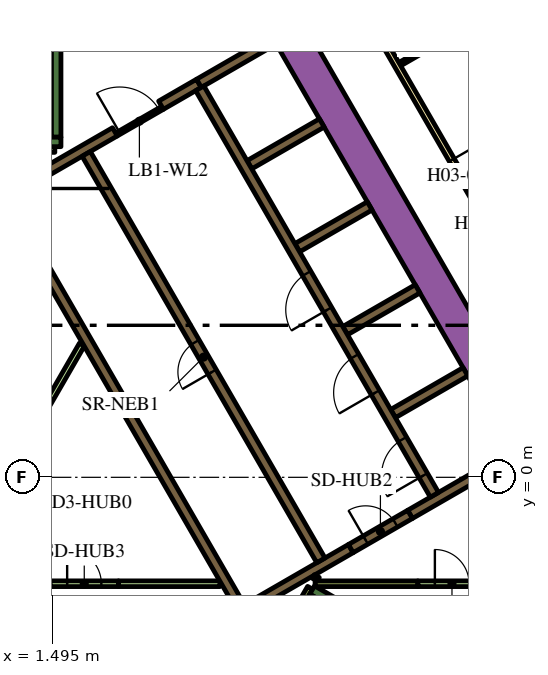
"""IFC4 building model, lengths in metres.
Left out: names, types, materials, properties, quantities, classifications, styles, units other than length and angle.
Written with IfcOpenShell. Run it as: python <this file> out.ifc"""

import sys

from ifc_helpers import new_model, si_unit, direction, frame, frame_2d, origin, place, context, subcontext, project, spatial, polyline, rectangle, outline, extrude, element, fill, save


model = new_model("IFC4")
c1 = context("Model", 3, precision=1e-05, world=origin(), true_north=direction((0.0, 1.0)))
c2 = subcontext(c1, "Body", "Model", "MODEL_VIEW")
j1 = project(units=[si_unit("LENGTHUNIT", "METRE"), si_unit("PLANEANGLEUNIT", "RADIAN")], contexts=[c1])
p1 = place(None, origin())
s1 = spatial("IfcSite", under=j1, at=p1, CompositionType="ELEMENT")
p2 = place(p1, origin())
s2 = spatial("IfcBuilding", under=s1, at=p2, CompositionType="ELEMENT")
p3 = place(p2, frame((0.0, 0.0, 54.9)))
s3 = spatial("IfcBuildingStorey", under=s2, at=p3, CompositionType="ELEMENT", Elevation=54.9)
p4 = place(p3, frame((6.776, 13.364, 0.0), z_axis=(0.0, 0.0, 1.0), x_axis=(0.500004177138, -0.8660229921, 0.0)))
e1 = element("IfcWall", 1, at=p4, inside=s3, PredefinedType="SOLIDWALL", context=c2, shape_type="SweptSolid", body=[
    extrude(rectangle(XDim=20.204, YDim=0.9, at=frame_2d((10.102, 0.0))), origin(), (0.0, 0.0, 1.0), 3.9),
])
p5 = place(p3, frame((8.334, -2.964, 0.0), z_axis=(0.0, 0.0, 1.0), x_axis=(0.866016039709, -0.500016218704, 0.0)))
e2 = element("IfcWall", 2, at=p5, inside=s3, PredefinedType="SOLIDWALL", context=c2, shape_type="SweptSolid", body=[
    extrude(rectangle(XDim=7.05, YDim=0.25, at=frame_2d((3.525, 0.0))), origin(), (0.0, 0.0, 1.0), 3.9),
])
p6 = place(p3, frame((8.163, -3.511, 0.0), z_axis=(0.0, 0.0, 1.0), x_axis=(0.500127794843, 0.865951608824, 0.0)))
e3 = element("IfcWall", 3, at=p6, inside=s3, PredefinedType="SOLIDWALL", context=c2, shape_type="SweptSolid", body=[
    extrude(rectangle(XDim=0.435, YDim=0.25, at=frame_2d((0.217, 0.0))), origin(), (0.0, 0.0, 1.0), 3.9),
])
p7 = place(p3, frame((1.6, 8.95, 0.0), z_axis=(0.0, 0.0, 1.0), x_axis=(0.0, 1.0, 0.0)))
e4 = element("IfcWall", 4, at=p7, inside=s3, PredefinedType="SOLIDWALL", context=c2, shape_type="SweptSolid", body=[
    extrude(rectangle(XDim=6.8, YDim=0.25, at=frame_2d((3.4, 0.0))), origin(), (0.0, 0.0, 1.0), 3.9),
])
p8 = place(p3, frame((1.05, 8.825, 0.0), z_axis=(0.0, 0.0, 1.0), x_axis=(1.0, 0.0, 0.0)))
e5 = element("IfcWall", 5, at=p8, inside=s3, PredefinedType="SOLIDWALL", context=c2, shape_type="SweptSolid", body=[
    extrude(rectangle(XDim=0.675, YDim=0.25, at=frame_2d((0.337, 0.0))), origin(), (0.0, 0.0, 1.0), 3.9),
])
p9 = place(p3, frame((10.464, 1.677, 0.0), z_axis=(0.0, 0.0, 1.0), x_axis=(0.86605622881, 0.499946605688, 0.0)))
e6 = element("IfcWall", 6, at=p9, inside=s3, PredefinedType="SOLIDWALL", context=c2, shape_type="SweptSolid", body=[
    extrude(rectangle(XDim=2.2, YDim=0.25, at=frame_2d((1.1, 0.0))), origin(), (0.0, 0.0, 1.0), 3.9),
])
p10 = place(p3, origin())
e7 = element("IfcWall", 7, at=p10, inside=s3, PredefinedType="SOLIDWALL", context=c2, shape_type="SweptSolid", body=[
    extrude(outline(polyline([(0.335, 6.925), (0.335, 6.925), (0.335, 7.075), (0.335, 7.075), (0.335, 7.075), (0.245, 7.075), (0.079, 7.363), (0.035, 7.439), (0.252, 7.564), (0.377, 7.348), (6.552, -3.348), (6.677, -3.564), (6.46, -3.689), (4.897, -0.981), (0.332, 6.925), (0.335, 6.925), (0.335, 6.925)])), origin(), (0.0, 0.0, 1.0), 3.9),
])
p11 = place(p3, frame((4.358, 9.791, 0.0), z_axis=(0.0, 0.0, 1.0), x_axis=(0.866079547155, 0.499906209203, 0.0)))
e8 = element("IfcWall", 8, at=p11, inside=s3, PredefinedType="SOLIDWALL", context=c2, shape_type="SweptSolid", body=[
    extrude(rectangle(XDim=1.15, YDim=0.25, at=frame_2d((0.575, 0.0))), origin(), (0.0, 0.0, 1.0), 3.9),
])
p12 = place(p3, frame((5.356, 10.367, 0.0), z_axis=(0.0, 0.0, 1.0), x_axis=(0.865978535641, 0.50008116922, 0.0)))
e9 = element("IfcWall", 9, at=p12, inside=s3, PredefinedType="SOLIDWALL", context=c2, shape_type="SweptSolid", body=[
    extrude(rectangle(XDim=2.278, YDim=0.25, at=frame_2d((1.139, 0.0))), origin(), (0.0, 0.0, 1.0), 3.9),
])
p13 = place(p3, frame((0.314, 7.456, 0.0), z_axis=(0.0, 0.0, 1.0), x_axis=(0.866013897511, 0.50001992892, 0.0)))
e10 = element("IfcWall", 10, at=p13, inside=s3, PredefinedType="SOLIDWALL", context=c2, shape_type="SweptSolid", body=[
    extrude(rectangle(XDim=3.268, YDim=0.25, at=frame_2d((1.634, 0.0))), origin(), (0.0, 0.0, 1.0), 3.9),
])
p14 = place(p3, frame((9.352, -1.875, 0.0), z_axis=(0.0, 0.0, 1.0), x_axis=(-0.866024844342, -0.500000968981, 0.0)))
e11 = element("IfcWall", 11, at=p14, inside=s3, PredefinedType="SOLIDWALL", context=c2, shape_type="SweptSolid", body=[
    extrude(rectangle(XDim=3.162, YDim=0.25, at=frame_2d((1.581, 0.0))), origin(), (0.0, 0.0, 1.0), 3.9),
])
for number, where, z_axis, x_axis in (
    (12, (6.684, 8.224, 0.0), (0.0, 0.0, 1.0), (0.866, 0.5, 0.0)),
    (13, (7.944, 6.041, 0.0), (0.0, 0.0, 1.0), (0.866, 0.5, 0.0)),
    (14, (9.204, 3.859, 0.0), (0.0, 0.0, 1.0), (0.866, 0.5, 0.0)),
):
    element("IfcWall", number, at=place(p3, frame(where, z_axis=z_axis, x_axis=x_axis)), inside=s3, PredefinedType="SOLIDWALL", context=c2, shape_type="SweptSolid", body=[
        extrude(rectangle(XDim=2.2, YDim=0.25, at=frame_2d((1.1, 0.0))), origin(), (0.0, 0.0, 1.0), 3.9),
    ])
p15 = place(p3, frame((10.911, -0.975, 0.0), z_axis=(0.0, 0.0, 1.0), x_axis=(0.866046979468, 0.499962627957, 0.0)))
e15 = element("IfcWall", 15, at=p15, inside=s3, PredefinedType="SOLIDWALL", context=c2, shape_type="SweptSolid", body=[
    extrude(rectangle(XDim=3.138, YDim=0.25, at=frame_2d((1.569, 0.0))), origin(), (0.0, 0.0, 1.0), 3.9),
])
p16 = place(p3, frame((8.412, -2.8, 0.0), z_axis=(0.0, 0.0, 1.0), x_axis=(1.0, 0.0, 0.0)))
e16 = element("IfcWall", 16, at=p16, inside=s3, PredefinedType="PARTITIONING", context=c2, shape_type="SweptSolid", body=[
    extrude(rectangle(XDim=2.702, YDim=0.15, at=frame_2d((1.351, 0.0))), origin(), (0.0, 0.0, 1.0), 3.9),
])
p17 = place(p3, frame((8.459, -2.599, 0.0), z_axis=(0.0, 0.0, 1.0), x_axis=(-0.501919277433, -0.864914469148, 0.0)))
e17 = element("IfcWall", 17, at=p17, inside=s3, PredefinedType="PARTITIONING", context=c2, shape_type="SweptSolid", body=[
    extrude(rectangle(XDim=0.109, YDim=0.15, at=frame_2d((0.054, 0.0))), origin(), (0.0, 0.0, 1.0), 3.9),
])
p18 = place(p3, frame((8.281, -2.907, 0.0), z_axis=(0.0, 0.0, 1.0), x_axis=(-0.500193841991, -0.86591346013, 0.0)))
e18 = element("IfcWall", 18, at=p18, inside=s3, PredefinedType="PARTITIONING", context=c2, shape_type="SweptSolid", body=[
    extrude(rectangle(XDim=0.583, YDim=0.15, at=frame_2d((0.292, 0.0))), origin(), (0.0, 0.0, 1.0), 3.9),
])
p19 = place(p3, frame((3.238, -2.8, 0.0), z_axis=(0.0, 0.0, 1.0), x_axis=(1.0, 0.0, 0.0)))
e19 = element("IfcWall", 19, at=p19, inside=s3, PredefinedType="PARTITIONING", context=c2, shape_type="SweptSolid", body=[
    extrude(rectangle(XDim=2.672, YDim=0.15, at=frame_2d((1.336, 0.0))), origin(), (0.0, 0.0, 1.0), 2.75),
])
p20 = place(p3, frame((1.016, 1.309, 0.0), z_axis=(0.0, 0.0, 1.0), x_axis=(0.49998231768, 0.866035612436, 0.0)))
e20 = element("IfcWall", 20, at=p20, inside=s3, PredefinedType="PARTITIONING", context=c2, shape_type="SweptSolid", body=[
    extrude(rectangle(XDim=2.521, YDim=0.15, at=frame_2d((1.26, 0.0))), origin(), (0.0, 0.0, 1.0), 2.75),
])
p21 = place(p3, frame((1.05, 8.625, 0.0), z_axis=(0.0, 0.0, 1.0), x_axis=(1.0, 0.0, 0.0)))
e21 = element("IfcWall", 21, at=p21, inside=s3, PredefinedType="PARTITIONING", context=c2, shape_type="SweptSolid", body=[
    extrude(rectangle(XDim=0.514, YDim=0.15, at=frame_2d((0.257, 0.0))), origin(), (0.0, 0.0, 1.0), 2.75),
])
p22 = place(p3, frame((11.553, -0.46, 0.0), z_axis=(0.0, 0.0, 1.0), x_axis=(-0.500006514828, 0.866021642414, 0.0)))
e22 = element("IfcWall", 22, at=p22, inside=s3, PredefinedType="SOLIDWALL", context=c2, shape_type="SweptSolid", body=[
    extrude(rectangle(XDim=12.35, YDim=0.25, at=frame_2d((6.175, 0.0))), origin(), (0.0, 0.0, 1.0), 3.9),
])
p23 = place(p22, frame((0.585, 0.0, 0.0)))
e23 = element("IfcOpeningElement", 23, at=p23, cuts=e22, PredefinedType="OPENING", context=c2, shape_type="SweptSolid", body=[
    extrude(rectangle(XDim=1.1, YDim=2.1, at=frame_2d((0.55, 1.05))), frame((0.0, 0.135, 0.0), z_axis=(0.0, -1.0, 0.0), x_axis=(1.0, 0.0, 0.0)), (0.0, 0.0, 1.0), 0.27),
])
p24 = place(p22, frame((3.105, 0.0, 0.0)))
e24 = element("IfcOpeningElement", 24, at=p24, cuts=e22, PredefinedType="OPENING", context=c2, shape_type="SweptSolid", body=[
    extrude(rectangle(XDim=1.1, YDim=2.1, at=frame_2d((0.55, 1.05))), frame((0.0, 0.135, 0.0), z_axis=(0.0, -1.0, 0.0), x_axis=(1.0, 0.0, 0.0)), (0.0, 0.0, 1.0), 0.27),
])
p25 = place(p22, frame((5.625, 0.0, 0.0)))
e25 = element("IfcOpeningElement", 25, at=p25, cuts=e22, PredefinedType="OPENING", context=c2, shape_type="SweptSolid", body=[
    extrude(rectangle(XDim=1.1, YDim=2.1, at=frame_2d((0.55, 1.05))), frame((0.0, 0.135, 0.0), z_axis=(0.0, -1.0, 0.0), x_axis=(1.0, 0.0, 0.0)), (0.0, 0.0, 1.0), 0.27),
])
p26 = place(p3, frame((8.565, -2.185, 0.0), z_axis=(0.0, 0.0, 1.0), x_axis=(-0.499997954832, 0.866026584559, 0.0)))
e26 = element("IfcWall", 26, at=p26, inside=s3, PredefinedType="SOLIDWALL", context=c2, shape_type="SweptSolid", body=[
    extrude(rectangle(XDim=12.35, YDim=0.25, at=frame_2d((6.175, 0.0))), origin(), (0.0, 0.0, 1.0), 3.9),
])
p27 = place(p26, frame((5.725, 0.0, 0.0)))
e27 = element("IfcOpeningElement", 27, at=p27, cuts=e26, PredefinedType="OPENING", context=c2, shape_type="SweptSolid", body=[
    extrude(rectangle(XDim=0.9, YDim=2.1, at=frame_2d((0.45, 1.05))), frame((0.0, 0.135, 0.0), z_axis=(0.0, -1.0, 0.0), x_axis=(1.0, 0.0, 0.0)), (0.0, 0.0, 1.0), 0.27),
])
p28 = place(p3, frame((3.183, 9.02, 0.0), z_axis=(0.0, 0.0, 1.0), x_axis=(0.866034573852, 0.49998411664, 0.0)))
e28 = element("IfcWall", 28, at=p28, inside=s3, PredefinedType="PARTITIONING", context=c2, shape_type="SweptSolid", body=[
    extrude(rectangle(XDim=1.4, YDim=0.09, at=frame_2d((0.7, 0.0))), origin(), (0.0, 0.0, 1.0), 2.75),
])
p29 = place(p28, frame((0.1, 0.0, 0.0)))
e29 = element("IfcOpeningElement", 29, at=p29, cuts=e28, PredefinedType="OPENING", context=c2, shape_type="SweptSolid", body=[
    extrude(rectangle(XDim=1.2, YDim=2.1, at=frame_2d((0.6, 1.05))), frame((0.0, 0.055, 0.0), z_axis=(0.0, -1.0, 0.0), x_axis=(1.0, 0.0, 0.0)), (0.0, 0.0, 1.0), 0.11),
])
p30 = place(p3, frame((9.352, -1.875, 0.0), z_axis=(0.0, 0.0, 1.0), x_axis=(0.865989075817, 0.500062916607, 0.0)))
e30 = element("IfcWall", 30, at=p30, inside=s3, PredefinedType="SOLIDWALL", context=c2, shape_type="SweptSolid", body=[
    extrude(rectangle(XDim=1.8, YDim=0.25, at=frame_2d((0.9, 0.0))), origin(), (0.0, 0.0, 1.0), 3.9),
])
p31 = place(p30, frame((0.45, 0.0, 0.0)))
e31 = element("IfcOpeningElement", 31, at=p31, cuts=e30, PredefinedType="OPENING", context=c2, shape_type="SweptSolid", body=[
    extrude(rectangle(XDim=0.9, YDim=2.1, at=frame_2d((0.45, 1.05))), frame((0.0, 0.135, 0.0), z_axis=(0.0, -1.0, 0.0), x_axis=(1.0, 0.0, 0.0)), (0.0, 0.0, 1.0), 0.27),
])
p32 = place(p3, frame((1.438, -2.8, 0.0), z_axis=(0.0, 0.0, 1.0), x_axis=(1.0, 0.0, 0.0)))
e32 = element("IfcWall", 32, at=p32, inside=s3, PredefinedType="PARTITIONING", context=c2, shape_type="SweptSolid", body=[
    extrude(rectangle(XDim=1.8, YDim=0.15, at=frame_2d((0.9, 0.0))), origin(), (0.0, 0.0, 1.0), 2.75),
])
p33 = place(p32, frame((0.45, 0.0, 0.0)))
e33 = element("IfcOpeningElement", 33, at=p33, cuts=e32, PredefinedType="OPENING", context=c2, shape_type="SweptSolid", body=[
    extrude(rectangle(XDim=0.9, YDim=2.1, at=frame_2d((0.45, 1.05))), frame((0.0, 0.085, 0.0), z_axis=(0.0, -1.0, 0.0), x_axis=(1.0, 0.0, 0.0)), (0.0, 0.0, 1.0), 0.17),
])
p34 = place(p3, frame((11.115, -2.8, 0.0), z_axis=(0.0, 0.0, 1.0), x_axis=(1.0, 0.0, 0.0)))
e34 = element("IfcWall", 34, at=p34, inside=s3, PredefinedType="PARTITIONING", context=c2, shape_type="SweptSolid", body=[
    extrude(rectangle(XDim=1.8, YDim=0.15, at=frame_2d((0.9, 0.0))), origin(), (0.0, 0.0, 1.0), 2.75),
])
p35 = place(p34, frame((0.45, 0.0, 0.0)))
e35 = element("IfcOpeningElement", 35, at=p35, cuts=e34, PredefinedType="OPENING", context=c2, shape_type="SweptSolid", body=[
    extrude(rectangle(XDim=0.9, YDim=2.1, at=frame_2d((0.45, 1.05))), frame((0.0, 0.085, 0.0), z_axis=(0.0, -1.0, 0.0), x_axis=(1.0, 0.0, 0.0)), (0.0, 0.0, 1.0), 0.17),
])
p36 = place(p3, frame((6.163, 18.475, 0.0), z_axis=(0.0, 0.0, 1.0), x_axis=(0.500001317485, -0.866024643133, 0.0)))
e36 = element("IfcWall", 36, at=p36, inside=s3, PredefinedType="PARTITIONING", context=c2, shape_type="SweptSolid", body=[
    extrude(rectangle(XDim=25.767, YDim=0.15, at=frame_2d((12.883, 0.0))), origin(), (0.0, 0.0, 1.0), 2.75),
])
p37 = place(p36, frame((24.586, 0.0, 0.0)))
e37 = element("IfcOpeningElement", 37, at=p37, cuts=e36, PredefinedType="OPENING", context=c2, shape_type="SweptSolid", body=[
    extrude(rectangle(XDim=1.0, YDim=2.1, at=frame_2d((0.5, 1.05))), frame((0.0, 0.085, 0.0), z_axis=(0.0, -1.0, 0.0), x_axis=(1.0, 0.0, 0.0)), (0.0, 0.0, 1.0), 0.17),
])
p38 = place(p36, frame((13.144, 0.0, 0.0)))
e38 = element("IfcOpeningElement", 38, at=p38, cuts=e36, PredefinedType="OPENING", context=c2, shape_type="SweptSolid", body=[
    extrude(rectangle(XDim=1.0, YDim=2.1, at=frame_2d((0.5, 1.05))), frame((0.0, 0.085, 0.0), z_axis=(0.0, -1.0, 0.0), x_axis=(1.0, 0.0, 0.0)), (0.0, 0.0, 1.0), 0.17),
])
p39 = place(p36, frame((11.692, 0.0, 0.0)))
e39 = element("IfcOpeningElement", 39, at=p39, cuts=e36, PredefinedType="OPENING", context=c2, shape_type="SweptSolid", body=[
    extrude(rectangle(XDim=1.0, YDim=2.1, at=frame_2d((0.5, 1.05))), frame((0.0, 0.085, 0.0), z_axis=(0.0, -1.0, 0.0), x_axis=(1.0, 0.0, 0.0)), (0.0, 0.0, 1.0), 0.17),
])
p40 = place(p36, frame((0.572, 0.0, 0.0)))
e40 = element("IfcOpeningElement", 40, at=p40, cuts=e36, PredefinedType="OPENING", context=c2, shape_type="SweptSolid", body=[
    extrude(rectangle(XDim=1.0, YDim=2.1, at=frame_2d((0.5, 1.05))), frame((0.0, 0.085, 0.0), z_axis=(0.0, -1.0, 0.0), x_axis=(1.0, 0.0, 0.0)), (0.0, 0.0, 1.0), 0.17),
])
p41 = place(p3, frame((10.64, 10.871, 0.0), z_axis=(0.0, 0.0, 1.0), x_axis=(0.866036505625, 0.499980770555, 0.0)))
e41 = element("IfcWall", 41, at=p41, inside=s3, PredefinedType="PARTITIONING", context=c2, shape_type="SweptSolid", body=[
    extrude(rectangle(XDim=2.7, YDim=0.1, at=frame_2d((1.35, 0.0))), origin(), (0.0, 0.0, 1.0), 2.75),
])
p42 = place(p41, frame((0.6, 0.0, 0.0)))
e42 = element("IfcOpeningElement", 42, at=p42, cuts=e41, PredefinedType="OPENING", context=c2, shape_type="SweptSolid", body=[
    extrude(rectangle(XDim=0.9, YDim=2.1, at=frame_2d((0.45, 1.05))), frame((0.0, 0.06, 0.0), z_axis=(0.0, -1.0, 0.0), x_axis=(1.0, 0.0, 0.0)), (0.0, 0.0, 1.0), 0.12),
])
p43 = place(p23, origin())
e43 = element("IfcDoor", 43, at=p43, inside=s3, OperationType="DOUBLE_DOOR_SLIDING", PredefinedType="DOOR", context=c2, shape_type="SweptSolid", body=[
    extrude(rectangle(XDim=1.1, YDim=2.1, at=frame_2d((0.55, 1.05))), frame((0.0, 0.025, 0.0), z_axis=(0.0, -1.0, 0.0), x_axis=(1.0, 0.0, 0.0)), (0.0, 0.0, 1.0), 0.05),
])
fill(e23, e43)
p44 = place(p24, origin())
e44 = element("IfcDoor", 44, at=p44, inside=s3, OperationType="DOUBLE_DOOR_SLIDING", PredefinedType="DOOR", context=c2, shape_type="SweptSolid", body=[
    extrude(rectangle(XDim=1.1, YDim=2.1, at=frame_2d((0.55, 1.05))), frame((0.0, 0.025, 0.0), z_axis=(0.0, -1.0, 0.0), x_axis=(1.0, 0.0, 0.0)), (0.0, 0.0, 1.0), 0.05),
])
fill(e24, e44)
p45 = place(p25, origin())
e45 = element("IfcDoor", 45, at=p45, inside=s3, OperationType="DOUBLE_DOOR_SLIDING", PredefinedType="DOOR", context=c2, shape_type="SweptSolid", body=[
    extrude(rectangle(XDim=1.1, YDim=2.1, at=frame_2d((0.55, 1.05))), frame((0.0, 0.025, 0.0), z_axis=(0.0, -1.0, 0.0), x_axis=(1.0, 0.0, 0.0)), (0.0, 0.0, 1.0), 0.05),
])
fill(e25, e45)
p46 = place(p27, origin())
e46 = element("IfcDoor", 46, at=p46, inside=s3, OperationType="SINGLE_SWING_LEFT", PredefinedType="DOOR", context=c2, shape_type="SweptSolid", body=[
    extrude(rectangle(XDim=0.9, YDim=2.1, at=frame_2d((0.45, 1.05))), frame((0.0, 0.025, 0.0), z_axis=(0.0, -1.0, 0.0), x_axis=(1.0, 0.0, 0.0)), (0.0, 0.0, 1.0), 0.05),
])
fill(e27, e46)
p47 = place(p29, origin())
e47 = element("IfcDoor", 47, at=p47, inside=s3, OperationType="SINGLE_SWING_LEFT", PredefinedType="DOOR", context=c2, shape_type="SweptSolid", body=[
    extrude(rectangle(XDim=1.2, YDim=2.1, at=frame_2d((0.6, 1.05))), frame((0.0, 0.025, 0.0), z_axis=(0.0, -1.0, 0.0), x_axis=(1.0, 0.0, 0.0)), (0.0, 0.0, 1.0), 0.05),
])
fill(e29, e47)
p48 = place(p31, origin())
e48 = element("IfcDoor", 48, at=p48, inside=s3, OperationType="SINGLE_SWING_LEFT", PredefinedType="DOOR", context=c2, shape_type="SweptSolid", body=[
    extrude(rectangle(XDim=0.9, YDim=2.1, at=frame_2d((0.45, 1.05))), frame((0.0, 0.025, 0.0), z_axis=(0.0, -1.0, 0.0), x_axis=(1.0, 0.0, 0.0)), (0.0, 0.0, 1.0), 0.05),
])
fill(e31, e48)
p49 = place(p33, origin())
e49 = element("IfcDoor", 49, at=p49, inside=s3, OperationType="SINGLE_SWING_LEFT", PredefinedType="DOOR", context=c2, shape_type="SweptSolid", body=[
    extrude(rectangle(XDim=0.9, YDim=2.1, at=frame_2d((0.45, 1.05))), frame((0.0, 0.025, 0.0), z_axis=(0.0, -1.0, 0.0), x_axis=(1.0, 0.0, 0.0)), (0.0, 0.0, 1.0), 0.05),
])
fill(e33, e49)
p50 = place(p35, origin())
e50 = element("IfcDoor", 50, at=p50, inside=s3, OperationType="SINGLE_SWING_LEFT", PredefinedType="DOOR", context=c2, shape_type="SweptSolid", body=[
    extrude(rectangle(XDim=0.9, YDim=2.1, at=frame_2d((0.45, 1.05))), frame((0.0, 0.025, 0.0), z_axis=(0.0, -1.0, 0.0), x_axis=(1.0, 0.0, 0.0)), (0.0, 0.0, 1.0), 0.05),
])
fill(e35, e50)
p51 = place(p39, origin())
e51 = element("IfcDoor", 51, at=p51, inside=s3, OperationType="SINGLE_SWING_RIGHT", PredefinedType="DOOR", context=c2, shape_type="SweptSolid", body=[
    extrude(rectangle(XDim=1.0, YDim=2.1, at=frame_2d((0.5, 1.05))), frame((0.0, 0.025, 0.0), z_axis=(0.0, -1.0, 0.0), x_axis=(1.0, 0.0, 0.0)), (0.0, 0.0, 1.0), 0.05),
])
fill(e39, e51)
p52 = place(p42, origin())
e52 = element("IfcDoor", 52, at=p52, inside=s3, OperationType="SINGLE_SWING_LEFT", PredefinedType="DOOR", context=c2, shape_type="SweptSolid", body=[
    extrude(rectangle(XDim=0.9, YDim=2.1, at=frame_2d((0.45, 1.05))), frame((0.0, 0.025, 0.0), z_axis=(0.0, -1.0, 0.0), x_axis=(1.0, 0.0, 0.0)), (0.0, 0.0, 1.0), 0.05),
])
fill(e42, e52)
save(model, sys.argv[1])
